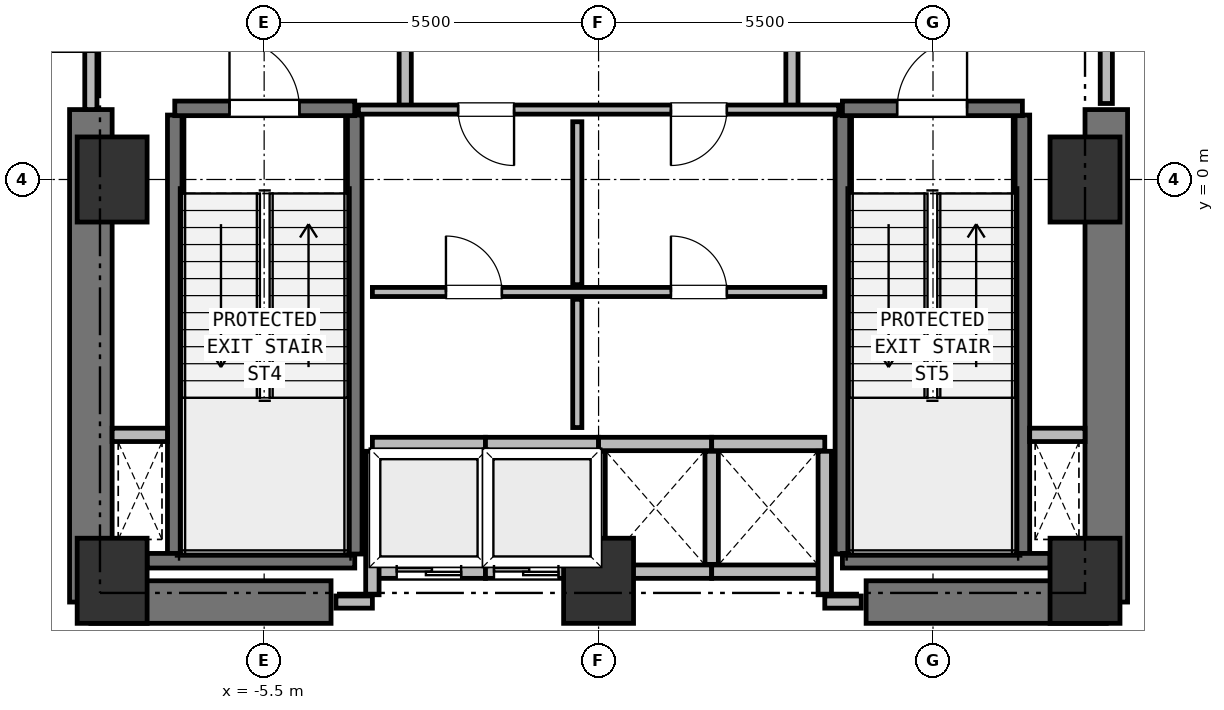
"""IFC4 building model, lengths in metres.
Left out: names, types, materials, properties, quantities, classifications, styles, units other than length and angle.
Written with IfcOpenShell. Run it as: python <this file> out.ifc"""

import sys

from ifc_helpers import new_model, si_unit, direction, frame, frame_2d, origin, origin_2d, place, context, subcontext, project, spatial, rectangle, extrude, element, fill, save


model = new_model("IFC4")
c1 = context("Model", 3, precision=1e-05, world=origin(), true_north=direction((0.0, 1.0)))
c2 = subcontext(c1, "Body", "Model", "MODEL_VIEW")
j1 = project(units=[si_unit("LENGTHUNIT", "METRE"), si_unit("PLANEANGLEUNIT", "RADIAN")], contexts=[c1])
p1 = place(None, origin())
s1 = spatial("IfcSite", under=j1, at=p1, CompositionType="ELEMENT")
p2 = place(p1, origin())
s2 = spatial("IfcBuilding", under=s1, at=p2, CompositionType="ELEMENT")
p3 = place(p2, frame((0.0, 0.0, 21.5)))
s3 = spatial("IfcBuildingStorey", under=s2, at=p3, CompositionType="ELEMENT", Elevation=21.5)
for number, where, z_axis, x_axis in (
    (1, (-8.0, -6.6, 0.0), (0.0, 0.0, 1.0), (1.0, 0.0, 0.0)),
    (2, (0.0, -6.6, 0.0), (0.0, 0.0, 1.0), (1.0, 0.0, 0.0)),
    (3, (8.0, -6.6, 0.0), (0.0, 0.0, 1.0), (1.0, 0.0, 0.0)),
    (4, (8.0, 0.0, 0.0), (0.0, 0.0, 1.0), (1.0, 0.0, 0.0)),
    (5, (-8.0, 0.0, 0.0), (0.0, 0.0, 1.0), (1.0, 0.0, 0.0)),
):
    element("IfcColumn", number, at=place(p3, frame(where, z_axis=z_axis, x_axis=x_axis)), inside=s3, PredefinedType="COLUMN", context=c2, shape_type="SweptSolid", body=[
        extrude(rectangle(XDim=1.15, YDim=1.4, at=origin_2d()), origin(), (0.0, 0.0, 1.0), 4.5),
    ])
for number, where, z_axis, x_axis in (
    (6, (-8.35, -6.95, 0.0), (0.0, 0.0, 1.0), (1.0, 0.0, 0.0)),
    (7, (4.4, -6.95, 0.0), (0.0, 0.0, 1.0), (1.0, 0.0, 0.0)),
):
    element("IfcWall", number, at=place(p3, frame(where, z_axis=z_axis, x_axis=x_axis)), inside=s3, PredefinedType="SHEAR", context=c2, shape_type="SweptSolid", body=[
        extrude(rectangle(XDim=3.95, YDim=0.7, at=frame_2d((1.975, 0.0))), origin(), (0.0, 0.0, 1.0), 4.22),
    ])
for number, where, z_axis, x_axis in (
    (8, (-8.35, -6.95, 0.0), (0.0, 0.0, 1.0), (0.0, 1.0, 0.0)),
    (9, (8.35, -6.95, 0.0), (0.0, 0.0, 1.0), (0.0, 1.0, 0.0)),
):
    element("IfcWall", number, at=place(p3, frame(where, z_axis=z_axis, x_axis=x_axis)), inside=s3, PredefinedType="SHEAR", context=c2, shape_type="SweptSolid", body=[
        extrude(rectangle(XDim=8.1, YDim=0.7, at=frame_2d((4.05, 0.0))), origin(), (0.0, 0.0, 1.0), 4.22),
    ])
p4 = place(p3, frame((-6.97, -6.16, 0.0), z_axis=(0.0, 0.0, 1.0), x_axis=(0.0, 1.0, 0.0)))
e10 = element("IfcWall", 10, at=p4, inside=s3, PredefinedType="SHEAR", context=c2, shape_type="SweptSolid", body=[
    extrude(rectangle(XDim=7.22, YDim=0.24, at=frame_2d((3.61, 0.0))), origin(), (0.0, 0.0, 1.0), 4.22),
])
p5 = place(p3, frame((-7.425, -6.27, 0.0), z_axis=(0.0, 0.0, 1.0), x_axis=(1.0, 0.0, 0.0)))
e11 = element("IfcWall", 11, at=p5, inside=s3, PredefinedType="SHEAR", context=c2, shape_type="SweptSolid", body=[
    extrude(rectangle(XDim=3.415, YDim=0.24, at=frame_2d((1.708, 0.0))), origin(), (0.0, 0.0, 1.0), 4.22),
])
p6 = place(p3, frame((-4.01, -6.16, 0.0), z_axis=(0.0, 0.0, 1.0), x_axis=(0.0, 1.0, 0.0)))
e12 = element("IfcWall", 12, at=p6, inside=s3, PredefinedType="SHEAR", context=c2, shape_type="SweptSolid", body=[
    extrude(rectangle(XDim=7.22, YDim=0.24, at=frame_2d((3.61, 0.0))), origin(), (0.0, 0.0, 1.0), 4.22),
])
p7 = place(p3, frame((-6.97, 1.17, 0.0), z_axis=(0.0, 0.0, 1.0), x_axis=(1.0, 0.0, 0.0)))
e13 = element("IfcWall", 13, at=p7, inside=s3, PredefinedType="SHEAR", context=c2, shape_type="SweptSolid", body=[
    extrude(rectangle(XDim=2.96, YDim=0.24, at=frame_2d((1.48, 0.0))), origin(), (0.0, 0.0, 1.0), 4.22),
])
p8 = place(p7, frame((0.9, 0.0, 0.0)))
e14 = element("IfcOpeningElement", 14, at=p8, cuts=e13, PredefinedType="OPENING", context=c2, shape_type="SweptSolid", body=[
    extrude(rectangle(XDim=1.15, YDim=2.15, at=frame_2d((0.575, 1.075))), frame((0.0, 0.13, 0.0), z_axis=(0.0, -1.0, 0.0), x_axis=(1.0, 0.0, 0.0)), (0.0, 0.0, 1.0), 0.26),
])
for number, where, z_axis, x_axis in (
    (15, (4.01, -6.16, 0.0), (0.0, 0.0, 1.0), (0.0, 1.0, 0.0)),
    (16, (6.97, -6.16, 0.0), (0.0, 0.0, 1.0), (0.0, 1.0, 0.0)),
):
    element("IfcWall", number, at=place(p3, frame(where, z_axis=z_axis, x_axis=x_axis)), inside=s3, PredefinedType="SHEAR", context=c2, shape_type="SweptSolid", body=[
        extrude(rectangle(XDim=7.22, YDim=0.24, at=frame_2d((3.61, 0.0))), origin(), (0.0, 0.0, 1.0), 4.22),
    ])
p9 = place(p3, frame((4.01, -6.27, 0.0), z_axis=(0.0, 0.0, 1.0), x_axis=(1.0, 0.0, 0.0)))
e17 = element("IfcWall", 17, at=p9, inside=s3, PredefinedType="SHEAR", context=c2, shape_type="SweptSolid", body=[
    extrude(rectangle(XDim=3.415, YDim=0.24, at=frame_2d((1.708, 0.0))), origin(), (0.0, 0.0, 1.0), 4.22),
])
p10 = place(p3, frame((4.01, 1.17, 0.0), z_axis=(0.0, 0.0, 1.0), x_axis=(1.0, 0.0, 0.0)))
e18 = element("IfcWall", 18, at=p10, inside=s3, PredefinedType="SHEAR", context=c2, shape_type="SweptSolid", body=[
    extrude(rectangle(XDim=2.96, YDim=0.24, at=frame_2d((1.48, 0.0))), origin(), (0.0, 0.0, 1.0), 4.22),
])
p11 = place(p10, frame((0.9, 0.0, 0.0)))
e19 = element("IfcOpeningElement", 19, at=p11, cuts=e18, PredefinedType="OPENING", context=c2, shape_type="SweptSolid", body=[
    extrude(rectangle(XDim=1.15, YDim=2.15, at=frame_2d((0.575, 1.075))), frame((0.0, 0.13, 0.0), z_axis=(0.0, -1.0, 0.0), x_axis=(1.0, 0.0, 0.0)), (0.0, 0.0, 1.0), 0.26),
])
for number, where, z_axis, x_axis in (
    (20, (-8.0, -4.2, 0.0), (0.0, 0.0, 1.0), (1.0, 0.0, 0.0)),
    (21, (7.09, -4.2, 0.0), (0.0, 0.0, 1.0), (1.0, 0.0, 0.0)),
):
    element("IfcWall", number, at=place(p3, frame(where, z_axis=z_axis, x_axis=x_axis)), inside=s3, PredefinedType="PARTITIONING", context=c2, shape_type="SweptSolid", body=[
        extrude(rectangle(XDim=0.91, YDim=0.22, at=frame_2d((0.455, 0.0))), origin(), (0.0, 0.0, 1.0), 4.22),
    ])
p12 = place(p3, frame((-3.72, -6.45, 0.0), z_axis=(0.0, 0.0, 1.0), x_axis=(1.0, 0.0, 0.0)))
e22 = element("IfcWall", 22, at=p12, inside=s3, PredefinedType="PARTITIONING", context=c2, shape_type="SweptSolid", body=[
    extrude(rectangle(XDim=1.86, YDim=0.22, at=frame_2d((0.93, 0.0))), origin(), (0.0, 0.0, 1.0), 3.8),
])
p13 = place(p12, frame((0.4, 0.0, 0.0)))
e23 = element("IfcOpeningElement", 23, at=p13, cuts=e22, PredefinedType="OPENING", context=c2, shape_type="SweptSolid", body=[
    extrude(rectangle(XDim=1.06, YDim=2.15, at=frame_2d((0.53, 1.075))), frame((0.0, 0.12, 0.0), z_axis=(0.0, -1.0, 0.0), x_axis=(1.0, 0.0, 0.0)), (0.0, 0.0, 1.0), 0.24),
])
p14 = place(p3, frame((-3.72, -4.35, 0.0), z_axis=(0.0, 0.0, 1.0), x_axis=(1.0, 0.0, 0.0)))
e24 = element("IfcWall", 24, at=p14, inside=s3, PredefinedType="PARTITIONING", context=c2, shape_type="SweptSolid", body=[
    extrude(rectangle(XDim=1.86, YDim=0.22, at=frame_2d((0.93, 0.0))), origin(), (0.0, 0.0, 1.0), 4.22),
])
p15 = place(p3, frame((-3.72, -6.83, 0.0), z_axis=(0.0, 0.0, 1.0), x_axis=(0.0, 1.0, 0.0)))
e25 = element("IfcWall", 25, at=p15, inside=s3, PredefinedType="PARTITIONING", context=c2, shape_type="SweptSolid", body=[
    extrude(rectangle(XDim=2.36, YDim=0.22, at=frame_2d((1.18, 0.0))), origin(), (0.0, 0.0, 1.0), 4.22),
])
p16 = place(p3, frame((-1.86, -6.33, 0.0), z_axis=(0.0, 0.0, 1.0), x_axis=(0.0, 1.0, 0.0)))
e26 = element("IfcWall", 26, at=p16, inside=s3, PredefinedType="PARTITIONING", context=c2, shape_type="SweptSolid", body=[
    extrude(rectangle(XDim=1.86, YDim=0.22, at=frame_2d((0.93, 0.0))), origin(), (0.0, 0.0, 1.0), 4.22),
])
p17 = place(p3, frame((-1.86, -6.45, 0.0), z_axis=(0.0, 0.0, 1.0), x_axis=(1.0, 0.0, 0.0)))
e27 = element("IfcWall", 27, at=p17, inside=s3, PredefinedType="PARTITIONING", context=c2, shape_type="SweptSolid", body=[
    extrude(rectangle(XDim=1.86, YDim=0.22, at=frame_2d((0.93, 0.0))), origin(), (0.0, 0.0, 1.0), 3.8),
])
p18 = place(p17, frame((0.14, 0.0, 0.0)))
e28 = element("IfcOpeningElement", 28, at=p18, cuts=e27, PredefinedType="OPENING", context=c2, shape_type="SweptSolid", body=[
    extrude(rectangle(XDim=1.06, YDim=2.15, at=frame_2d((0.53, 1.075))), frame((0.0, 0.12, 0.0), z_axis=(0.0, -1.0, 0.0), x_axis=(1.0, 0.0, 0.0)), (0.0, 0.0, 1.0), 0.24),
])
for number, where, z_axis, x_axis in (
    (29, (-1.86, -4.35, 0.0), (0.0, 0.0, 1.0), (1.0, 0.0, 0.0)),
    (30, (0.0, -6.33, 0.0), (0.0, 0.0, 1.0), (0.0, 1.0, 0.0)),
):
    element("IfcWall", number, at=place(p3, frame(where, z_axis=z_axis, x_axis=x_axis)), inside=s3, PredefinedType="PARTITIONING", context=c2, shape_type="SweptSolid", body=[
        extrude(rectangle(XDim=1.86, YDim=0.22, at=frame_2d((0.93, 0.0))), origin(), (0.0, 0.0, 1.0), 4.22),
    ])
p19 = place(p3, frame((0.0, -6.45, 0.0), z_axis=(0.0, 0.0, 1.0), x_axis=(1.0, 0.0, 0.0)))
e31 = element("IfcWall", 31, at=p19, inside=s3, PredefinedType="PARTITIONING", context=c2, shape_type="SweptSolid", body=[
    extrude(rectangle(XDim=1.86, YDim=0.22, at=frame_2d((0.93, 0.0))), origin(), (0.0, 0.0, 1.0), 3.8),
])
for number, where, z_axis, x_axis in (
    (32, (0.0, -4.35, 0.0), (0.0, 0.0, 1.0), (1.0, 0.0, 0.0)),
    (33, (1.86, -6.33, 0.0), (0.0, 0.0, 1.0), (0.0, 1.0, 0.0)),
):
    element("IfcWall", number, at=place(p3, frame(where, z_axis=z_axis, x_axis=x_axis)), inside=s3, PredefinedType="PARTITIONING", context=c2, shape_type="SweptSolid", body=[
        extrude(rectangle(XDim=1.86, YDim=0.22, at=frame_2d((0.93, 0.0))), origin(), (0.0, 0.0, 1.0), 4.22),
    ])
p20 = place(p3, frame((1.86, -6.45, 0.0), z_axis=(0.0, 0.0, 1.0), x_axis=(1.0, 0.0, 0.0)))
e34 = element("IfcWall", 34, at=p20, inside=s3, PredefinedType="PARTITIONING", context=c2, shape_type="SweptSolid", body=[
    extrude(rectangle(XDim=1.86, YDim=0.22, at=frame_2d((0.93, 0.0))), origin(), (0.0, 0.0, 1.0), 3.8),
])
p21 = place(p3, frame((1.86, -4.35, 0.0), z_axis=(0.0, 0.0, 1.0), x_axis=(1.0, 0.0, 0.0)))
e35 = element("IfcWall", 35, at=p21, inside=s3, PredefinedType="PARTITIONING", context=c2, shape_type="SweptSolid", body=[
    extrude(rectangle(XDim=1.86, YDim=0.22, at=frame_2d((0.93, 0.0))), origin(), (0.0, 0.0, 1.0), 4.22),
])
p22 = place(p3, frame((3.72, -6.83, 0.0), z_axis=(0.0, 0.0, 1.0), x_axis=(0.0, 1.0, 0.0)))
e36 = element("IfcWall", 36, at=p22, inside=s3, PredefinedType="PARTITIONING", context=c2, shape_type="SweptSolid", body=[
    extrude(rectangle(XDim=2.36, YDim=0.22, at=frame_2d((1.18, 0.0))), origin(), (0.0, 0.0, 1.0), 4.22),
])
p23 = place(p3, frame((-3.18, 1.15, 0.0), z_axis=(0.0, 0.0, 1.0), x_axis=(0.0, 1.0, 0.0)))
e37 = element("IfcWall", 37, at=p23, inside=s3, PredefinedType="PARTITIONING", context=c2, shape_type="SweptSolid", body=[
    extrude(rectangle(XDim=3.3, YDim=0.2, at=frame_2d((1.65, 0.0))), origin(), (0.0, 0.0, 1.0), 4.22),
])
p24 = place(p23, frame((1.08, 0.0, 0.0)))
e38 = element("IfcOpeningElement", 38, at=p24, cuts=e37, PredefinedType="OPENING", context=c2, shape_type="SweptSolid", body=[
    extrude(rectangle(XDim=1.15, YDim=2.15, at=frame_2d((0.575, 1.075))), frame((0.0, 0.11, 0.0), z_axis=(0.0, -1.0, 0.0), x_axis=(1.0, 0.0, 0.0)), (0.0, 0.0, 1.0), 0.22),
])
p25 = place(p3, frame((3.18, 1.15, 0.0), z_axis=(0.0, 0.0, 1.0), x_axis=(0.0, 1.0, 0.0)))
e39 = element("IfcWall", 39, at=p25, inside=s3, PredefinedType="PARTITIONING", context=c2, shape_type="SweptSolid", body=[
    extrude(rectangle(XDim=3.3, YDim=0.2, at=frame_2d((1.65, 0.0))), origin(), (0.0, 0.0, 1.0), 4.22),
])
p26 = place(p25, frame((1.08, 0.0, 0.0)))
e40 = element("IfcOpeningElement", 40, at=p26, cuts=e39, PredefinedType="OPENING", context=c2, shape_type="SweptSolid", body=[
    extrude(rectangle(XDim=1.15, YDim=2.15, at=frame_2d((0.575, 1.075))), frame((0.0, 0.11, 0.0), z_axis=(0.0, -1.0, 0.0), x_axis=(1.0, 0.0, 0.0)), (0.0, 0.0, 1.0), 0.22),
])
p27 = place(p3, frame((-8.35, 1.15, 0.0), z_axis=(0.0, 0.0, 1.0), x_axis=(0.0, 1.0, 0.0)))
e41 = element("IfcWall", 41, at=p27, inside=s3, PredefinedType="PARTITIONING", context=c2, shape_type="SweptSolid", body=[
    extrude(rectangle(XDim=5.4, YDim=0.2, at=frame_2d((2.7, 0.0))), origin(), (0.0, 0.0, 1.0), 4.22),
])
p28 = place(p27, frame((0.95, 0.0, 0.0)))
e42 = element("IfcOpeningElement", 42, at=p28, cuts=e41, PredefinedType="OPENING", context=c2, shape_type="SweptSolid", body=[
    extrude(rectangle(XDim=1.15, YDim=2.15, at=frame_2d((0.575, 1.075))), frame((0.0, 0.11, 0.0), z_axis=(0.0, -1.0, 0.0), x_axis=(1.0, 0.0, 0.0)), (0.0, 0.0, 1.0), 0.22),
])
p29 = place(p3, frame((8.35, 1.25, 0.0), z_axis=(0.0, 0.0, 1.0), x_axis=(0.0, 1.0, 0.0)))
e43 = element("IfcWall", 43, at=p29, inside=s3, PredefinedType="PARTITIONING", context=c2, shape_type="SweptSolid", body=[
    extrude(rectangle(XDim=5.3, YDim=0.2, at=frame_2d((2.65, 0.0))), origin(), (0.0, 0.0, 1.0), 4.22),
])
p30 = place(p29, frame((0.95, 0.0, 0.0)))
e44 = element("IfcOpeningElement", 44, at=p30, cuts=e43, PredefinedType="OPENING", context=c2, shape_type="SweptSolid", body=[
    extrude(rectangle(XDim=1.15, YDim=2.15, at=frame_2d((0.575, 1.075))), frame((0.0, 0.11, 0.0), z_axis=(0.0, -1.0, 0.0), x_axis=(1.0, 0.0, 0.0)), (0.0, 0.0, 1.0), 0.22),
])
p31 = place(p3, frame((3.95, 1.15, 0.0), z_axis=(0.0, 0.0, 1.0), x_axis=(-1.0, 0.0, 0.0)))
e45 = element("IfcWall", 45, at=p31, inside=s3, PredefinedType="PARTITIONING", context=c2, shape_type="SweptSolid", body=[
    extrude(rectangle(XDim=7.9, YDim=0.15, at=frame_2d((3.95, 0.0))), origin(), (0.0, 0.0, 1.0), 4.22),
])
p32 = place(p31, frame((5.34, 0.0, 0.0)))
e46 = element("IfcOpeningElement", 46, at=p32, cuts=e45, PredefinedType="OPENING", context=c2, shape_type="SweptSolid", body=[
    extrude(rectangle(XDim=0.92, YDim=2.05, at=frame_2d((0.46, 1.025))), frame((0.0, 0.085, 0.0), z_axis=(0.0, -1.0, 0.0), x_axis=(1.0, 0.0, 0.0)), (0.0, 0.0, 1.0), 0.17),
])
p33 = place(p31, frame((1.84, 0.0, 0.0)))
e47 = element("IfcOpeningElement", 47, at=p33, cuts=e45, PredefinedType="OPENING", context=c2, shape_type="SweptSolid", body=[
    extrude(rectangle(XDim=0.92, YDim=2.05, at=frame_2d((0.46, 1.025))), frame((0.0, 0.085, 0.0), z_axis=(0.0, -1.0, 0.0), x_axis=(1.0, 0.0, 0.0)), (0.0, 0.0, 1.0), 0.17),
])
for number, where, z_axis, x_axis in (
    (48, (-4.32, -6.95, 0.0), (0.0, 0.0, 1.0), (1.0, 0.0, 0.0)),
    (49, (3.72, -6.95, 0.0), (0.0, 0.0, 1.0), (1.0, 0.0, 0.0)),
):
    element("IfcWall", number, at=place(p3, frame(where, z_axis=z_axis, x_axis=x_axis)), inside=s3, PredefinedType="PARTITIONING", context=c2, shape_type="SweptSolid", body=[
        extrude(rectangle(XDim=0.6, YDim=0.2, at=frame_2d((0.3, 0.0))), origin(), (0.0, 0.0, 1.0), 4.22),
    ])
p34 = place(p3, frame((-3.72, -1.85, 0.0), z_axis=(0.0, 0.0, 1.0), x_axis=(1.0, 0.0, 0.0)))
e50 = element("IfcWall", 50, at=p34, inside=s3, PredefinedType="PARTITIONING", context=c2, shape_type="SweptSolid", body=[
    extrude(rectangle(XDim=7.44, YDim=0.15, at=frame_2d((3.72, 0.0))), origin(), (0.0, 0.0, 1.0), 4.22),
])
p35 = place(p34, frame((1.21, 0.0, 0.0)))
e51 = element("IfcOpeningElement", 51, at=p35, cuts=e50, PredefinedType="OPENING", context=c2, shape_type="SweptSolid", body=[
    extrude(rectangle(XDim=0.92, YDim=2.05, at=frame_2d((0.46, 1.025))), frame((0.0, 0.085, 0.0), z_axis=(0.0, -1.0, 0.0), x_axis=(1.0, 0.0, 0.0)), (0.0, 0.0, 1.0), 0.17),
])
p36 = place(p34, frame((4.91, 0.0, 0.0)))
e52 = element("IfcOpeningElement", 52, at=p36, cuts=e50, PredefinedType="OPENING", context=c2, shape_type="SweptSolid", body=[
    extrude(rectangle(XDim=0.92, YDim=2.05, at=frame_2d((0.46, 1.025))), frame((0.0, 0.085, 0.0), z_axis=(0.0, -1.0, 0.0), x_axis=(1.0, 0.0, 0.0)), (0.0, 0.0, 1.0), 0.17),
])
p37 = place(p3, frame((-0.35, -4.08, 0.0), z_axis=(0.0, 0.0, 1.0), x_axis=(0.0, 1.0, 0.0)))
e53 = element("IfcWall", 53, at=p37, inside=s3, PredefinedType="PARTITIONING", context=c2, shape_type="SweptSolid", body=[
    extrude(rectangle(XDim=2.11, YDim=0.15, at=frame_2d((1.055, 0.0))), origin(), (0.0, 0.0, 1.0), 4.22),
])
p38 = place(p3, frame((-0.35, -1.73, 0.0), z_axis=(0.0, 0.0, 1.0), x_axis=(0.0, 1.0, 0.0)))
e54 = element("IfcWall", 54, at=p38, inside=s3, PredefinedType="PARTITIONING", context=c2, shape_type="SweptSolid", body=[
    extrude(rectangle(XDim=2.68, YDim=0.15, at=frame_2d((1.34, 0.0))), origin(), (0.0, 0.0, 1.0), 4.22),
])
p39 = place(p8, origin())
e55 = element("IfcDoor", 55, at=p39, inside=s3, OperationType="SINGLE_SWING_LEFT", PredefinedType="DOOR", context=c2, shape_type="SweptSolid", body=[
    extrude(rectangle(XDim=1.15, YDim=2.15, at=frame_2d((0.575, 1.075))), frame((0.0, 0.025, 0.0), z_axis=(0.0, -1.0, 0.0), x_axis=(1.0, 0.0, 0.0)), (0.0, 0.0, 1.0), 0.05),
])
fill(e14, e55)
p40 = place(p11, origin())
e56 = element("IfcDoor", 56, at=p40, inside=s3, OperationType="SINGLE_SWING_RIGHT", PredefinedType="DOOR", context=c2, shape_type="SweptSolid", body=[
    extrude(rectangle(XDim=1.15, YDim=2.15, at=frame_2d((0.575, 1.075))), frame((0.0, 0.025, 0.0), z_axis=(0.0, -1.0, 0.0), x_axis=(1.0, 0.0, 0.0)), (0.0, 0.0, 1.0), 0.05),
])
fill(e19, e56)
p41 = place(p13, origin())
e57 = element("IfcDoor", 57, at=p41, inside=s3, OperationType="DOUBLE_DOOR_SLIDING", PredefinedType="DOOR", context=c2, shape_type="SweptSolid", body=[
    extrude(rectangle(XDim=1.06, YDim=2.15, at=frame_2d((0.53, 1.075))), frame((0.0, 0.025, 0.0), z_axis=(0.0, -1.0, 0.0), x_axis=(1.0, 0.0, 0.0)), (0.0, 0.0, 1.0), 0.05),
])
fill(e23, e57)
p42 = place(p18, origin())
e58 = element("IfcDoor", 58, at=p42, inside=s3, OperationType="DOUBLE_DOOR_SLIDING", PredefinedType="DOOR", context=c2, shape_type="SweptSolid", body=[
    extrude(rectangle(XDim=1.06, YDim=2.15, at=frame_2d((0.53, 1.075))), frame((0.0, 0.025, 0.0), z_axis=(0.0, -1.0, 0.0), x_axis=(1.0, 0.0, 0.0)), (0.0, 0.0, 1.0), 0.05),
])
fill(e28, e58)
p43 = place(p28, origin())
e59 = element("IfcDoor", 59, at=p43, inside=s3, OperationType="SINGLE_SWING_LEFT", PredefinedType="DOOR", context=c2, shape_type="SweptSolid", body=[
    extrude(rectangle(XDim=1.15, YDim=2.15, at=frame_2d((0.575, 1.075))), frame((0.0, 0.025, 0.0), z_axis=(0.0, -1.0, 0.0), x_axis=(1.0, 0.0, 0.0)), (0.0, 0.0, 1.0), 0.05),
])
fill(e42, e59)
p44 = place(p32, origin())
e60 = element("IfcDoor", 60, at=p44, inside=s3, OperationType="SINGLE_SWING_LEFT", PredefinedType="DOOR", context=c2, shape_type="SweptSolid", body=[
    extrude(rectangle(XDim=0.92, YDim=2.05, at=frame_2d((0.46, 1.025))), frame((0.0, 0.025, 0.0), z_axis=(0.0, -1.0, 0.0), x_axis=(1.0, 0.0, 0.0)), (0.0, 0.0, 1.0), 0.05),
])
fill(e46, e60)
p45 = place(p33, origin())
e61 = element("IfcDoor", 61, at=p45, inside=s3, OperationType="SINGLE_SWING_RIGHT", PredefinedType="DOOR", context=c2, shape_type="SweptSolid", body=[
    extrude(rectangle(XDim=0.92, YDim=2.05, at=frame_2d((0.46, 1.025))), frame((0.0, 0.025, 0.0), z_axis=(0.0, -1.0, 0.0), x_axis=(1.0, 0.0, 0.0)), (0.0, 0.0, 1.0), 0.05),
])
fill(e47, e61)
p46 = place(p35, origin())
e62 = element("IfcDoor", 62, at=p46, inside=s3, OperationType="SINGLE_SWING_LEFT", PredefinedType="DOOR", context=c2, shape_type="SweptSolid", body=[
    extrude(rectangle(XDim=0.92, YDim=2.05, at=frame_2d((0.46, 1.025))), frame((0.0, 0.025, 0.0), z_axis=(0.0, -1.0, 0.0), x_axis=(1.0, 0.0, 0.0)), (0.0, 0.0, 1.0), 0.05),
])
fill(e51, e62)
p47 = place(p36, origin())
e63 = element("IfcDoor", 63, at=p47, inside=s3, OperationType="SINGLE_SWING_LEFT", PredefinedType="DOOR", context=c2, shape_type="SweptSolid", body=[
    extrude(rectangle(XDim=0.92, YDim=2.05, at=frame_2d((0.46, 1.025))), frame((0.0, 0.025, 0.0), z_axis=(0.0, -1.0, 0.0), x_axis=(1.0, 0.0, 0.0)), (0.0, 0.0, 1.0), 0.05),
])
fill(e52, e63)
save(model, sys.argv[1])
